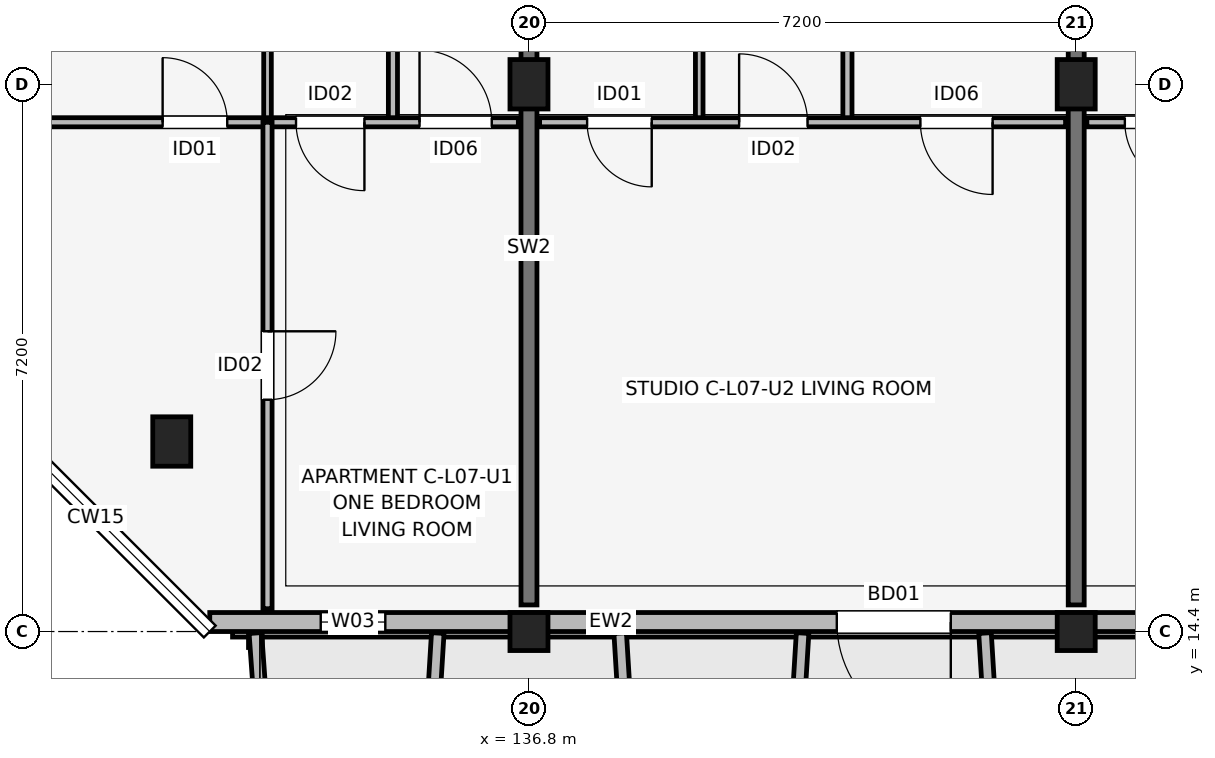
"""IFC4 building model, lengths in metres.
Left out: names, types, materials, properties, quantities, classifications, styles, units other than length and angle.
Written with IfcOpenShell. Run it as: python <this file> out.ifc"""

import sys

from ifc_helpers import new_model, si_unit, direction, frame, frame_2d, origin, origin_2d, place, context, subcontext, project, spatial, rectangle, extrude, element, fill, save


model = new_model("IFC4")
c1 = context("Model", 3, precision=1e-05, world=origin(), true_north=direction((0.0, 1.0)))
c2 = subcontext(c1, "Body", "Model", "MODEL_VIEW")
j1 = project(units=[si_unit("LENGTHUNIT", "METRE"), si_unit("PLANEANGLEUNIT", "RADIAN")], contexts=[c1])
p1 = place(None, origin())
s1 = spatial("IfcSite", under=j1, at=p1, CompositionType="ELEMENT")
p2 = place(p1, origin())
s2 = spatial("IfcBuilding", under=s1, at=p2, CompositionType="ELEMENT")
p3 = place(p2, frame((0.0, 0.0, 24.45)))
s3 = spatial("IfcBuildingStorey", under=s2, at=p3, CompositionType="ELEMENT", Elevation=24.45)
p4 = place(p3, frame((132.1, 16.9, 0.0), z_axis=(0.0, 0.0, 1.0), x_axis=(1.0, 0.0, 0.0)))
e1 = element("IfcColumn", 1, at=p4, inside=s3, PredefinedType="COLUMN", context=c2, shape_type="SweptSolid", body=[
    extrude(rectangle(XDim=0.5, YDim=0.65, at=origin_2d()), origin(), (0.0, 0.0, 1.0), 3.15),
])
p5 = place(p3, frame((136.8, 14.4, 0.0), z_axis=(0.0, 0.0, 1.0), x_axis=(1.0, 0.0, 0.0)))
e2 = element("IfcColumn", 2, at=p5, inside=s3, PredefinedType="COLUMN", context=c2, shape_type="SweptSolid", body=[
    extrude(rectangle(XDim=0.5, YDim=0.5, at=origin_2d()), origin(), (0.0, 0.0, 1.0), 3.15),
])
p6 = place(p3, frame((136.8, 21.6, 0.0), z_axis=(0.0, 0.0, 1.0), x_axis=(1.0, 0.0, 0.0)))
e3 = element("IfcColumn", 3, at=p6, inside=s3, PredefinedType="COLUMN", context=c2, shape_type="SweptSolid", body=[
    extrude(rectangle(XDim=0.5, YDim=0.65, at=origin_2d()), origin(), (0.0, 0.0, 1.0), 3.15),
])
p7 = place(p3, frame((144.0, 14.4, 0.0), z_axis=(0.0, 0.0, 1.0), x_axis=(1.0, 0.0, 0.0)))
e4 = element("IfcColumn", 4, at=p7, inside=s3, PredefinedType="COLUMN", context=c2, shape_type="SweptSolid", body=[
    extrude(rectangle(XDim=0.5, YDim=0.5, at=origin_2d()), origin(), (0.0, 0.0, 1.0), 3.15),
])
p8 = place(p3, frame((144.0, 21.6, 0.0), z_axis=(0.0, 0.0, 1.0), x_axis=(1.0, 0.0, 0.0)))
e5 = element("IfcColumn", 5, at=p8, inside=s3, PredefinedType="COLUMN", context=c2, shape_type="SweptSolid", body=[
    extrude(rectangle(XDim=0.5, YDim=0.65, at=origin_2d()), origin(), (0.0, 0.0, 1.0), 3.15),
])
for number, where, z_axis, x_axis in (
    (6, (136.8, 14.75, 0.0), (0.0, 0.0, 1.0), (0.0, 1.0, 0.0)),
    (7, (144.0, 14.75, 0.0), (0.0, 0.0, 1.0), (0.0, 1.0, 0.0)),
):
    element("IfcWall", number, at=place(p3, frame(where, z_axis=z_axis, x_axis=x_axis)), inside=s3, PredefinedType="SHEAR", context=c2, shape_type="SweptSolid", body=[
        extrude(rectangle(XDim=9.4, YDim=0.21, at=frame_2d((4.7, 0.0))), origin(), (0.0, 0.0, 1.0), 3.15),
    ])
p9 = place(p3, frame((132.6, 14.525, 0.0), z_axis=(0.0, 0.0, 1.0), x_axis=(1.0, 0.0, 0.0)))
e8 = element("IfcWall", 8, at=p9, inside=s3, PredefinedType="SOLIDWALL", context=c2, shape_type="SweptSolid", body=[
    extrude(rectangle(XDim=30.0, YDim=0.25, at=frame_2d((15.0, 0.0))), origin(), (0.0, 0.0, 1.0), 2.43),
])
p10 = place(p9, frame((9.75, 0.0, 0.0), z_axis=(0.0, 0.0, 1.0), x_axis=(-1.0, 0.0, 0.0)))
e9 = element("IfcOpeningElement", 9, at=p10, cuts=e8, PredefinedType="OPENING", context=c2, shape_type="SweptSolid", body=[
    extrude(rectangle(XDim=1.5, YDim=2.15, at=frame_2d((0.75, 1.075))), frame((0.0, 0.135, 0.0), z_axis=(0.0, -1.0, 0.0), x_axis=(1.0, 0.0, 0.0)), (0.0, 0.0, 1.0), 0.27),
])
p11 = place(p9, frame((24.3, 0.0, 0.0), z_axis=(0.0, 0.0, 1.0), x_axis=(-1.0, 0.0, 0.0)))
e10 = element("IfcOpeningElement", 10, at=p11, cuts=e8, PredefinedType="OPENING", context=c2, shape_type="SweptSolid", body=[
    extrude(rectangle(XDim=1.8, YDim=2.15, at=frame_2d((0.9, 1.075))), frame((0.0, 0.135, 0.0), z_axis=(0.0, -1.0, 0.0), x_axis=(1.0, 0.0, 0.0)), (0.0, 0.0, 1.0), 0.27),
])
p12 = place(p9, frame((1.46, 0.0, 0.75)))
e11 = element("IfcOpeningElement", 11, at=p12, cuts=e8, PredefinedType="OPENING", context=c2, shape_type="SweptSolid", body=[
    extrude(rectangle(XDim=0.85, YDim=1.4, at=frame_2d((0.425, 0.7))), frame((0.0, 0.135, 0.0), z_axis=(0.0, -1.0, 0.0), x_axis=(1.0, 0.0, 0.0)), (0.0, 0.0, 1.0), 0.27),
])
p13 = place(p9, frame((12.725, 0.0, 0.67)))
e12 = element("IfcOpeningElement", 12, at=p13, cuts=e8, PredefinedType="OPENING", context=c2, shape_type="SweptSolid", body=[
    extrude(rectangle(XDim=2.15, YDim=1.65, at=frame_2d((1.075, 0.825))), frame((0.0, 0.135, 0.0), z_axis=(0.0, -1.0, 0.0), x_axis=(1.0, 0.0, 0.0)), (0.0, 0.0, 1.0), 0.27),
])
p14 = place(p9, frame((19.045, 0.0, 0.75)))
e13 = element("IfcOpeningElement", 13, at=p14, cuts=e8, PredefinedType="OPENING", context=c2, shape_type="SweptSolid", body=[
    extrude(rectangle(XDim=0.6, YDim=1.25, at=frame_2d((0.3, 0.625))), frame((0.0, 0.135, 0.0), z_axis=(0.0, -1.0, 0.0), x_axis=(1.0, 0.0, 0.0)), (0.0, 0.0, 1.0), 0.27),
])
p15 = place(p9, frame((26.245, 0.0, 0.75)))
e14 = element("IfcOpeningElement", 14, at=p15, cuts=e8, PredefinedType="OPENING", context=c2, shape_type="SweptSolid", body=[
    extrude(rectangle(XDim=0.6, YDim=1.25, at=frame_2d((0.3, 0.625))), frame((0.0, 0.135, 0.0), z_axis=(0.0, -1.0, 0.0), x_axis=(1.0, 0.0, 0.0)), (0.0, 0.0, 1.0), 0.27),
])
p16 = place(p9, frame((27.93, 0.0, 0.75)))
e15 = element("IfcOpeningElement", 15, at=p16, cuts=e8, PredefinedType="OPENING", context=c2, shape_type="SweptSolid", body=[
    extrude(rectangle(XDim=1.34, YDim=1.55, at=frame_2d((0.67, 0.775))), frame((0.0, 0.135, 0.0), z_axis=(0.0, -1.0, 0.0), x_axis=(1.0, 0.0, 0.0)), (0.0, 0.0, 1.0), 0.27),
])
p17 = place(p3, frame((133.2, 14.38, 0.0), z_axis=(0.0, 0.0, 1.0), x_axis=(0.071317687608, -0.997453651772, 0.0)))
e16 = element("IfcWall", 16, at=p17, inside=s3, PredefinedType="ELEMENTEDWALL", context=c2, shape_type="SweptSolid", body=[
    extrude(rectangle(XDim=1.965, YDim=0.165, at=frame_2d((0.982, 0.0))), origin(), (0.0, 0.0, 1.0), 2.95),
])
p18 = place(p3, frame((135.6, 14.38, 0.0), z_axis=(0.0, 0.0, 1.0), x_axis=(-0.061170732449, -0.998127317276, 0.0)))
e17 = element("IfcWall", 17, at=p18, inside=s3, PredefinedType="ELEMENTEDWALL", context=c2, shape_type="SweptSolid", body=[
    extrude(rectangle(XDim=1.964, YDim=0.165, at=frame_2d((0.982, 0.0))), origin(), (0.0, 0.0, 1.0), 2.95),
])
for number, where, z_axis, x_axis in (
    (18, (138.0, 14.38, 0.0), (0.0, 0.0, 1.0), (0.061, -0.998, 0.0)),
    (19, (140.4, 14.38, 0.0), (0.0, 0.0, 1.0), (-0.061, -0.998, 0.0)),
    (20, (142.8, 14.38, 0.0), (0.0, 0.0, 1.0), (0.061, -0.998, 0.0)),
):
    element("IfcWall", number, at=place(p3, frame(where, z_axis=z_axis, x_axis=x_axis)), inside=s3, PredefinedType="ELEMENTEDWALL", context=c2, shape_type="SweptSolid", body=[
        extrude(rectangle(XDim=1.964, YDim=0.165, at=frame_2d((0.982, 0.0))), origin(), (0.0, 0.0, 1.0), 2.45),
    ])
p19 = place(p3, frame((133.36, 21.1, 0.0), z_axis=(0.0, 0.0, 1.0), x_axis=(0.0, 1.0, 0.0)))
e21 = element("IfcWall", 21, at=p19, inside=s3, PredefinedType="PARTITIONING", context=c2, shape_type="SweptSolid", body=[
    extrude(rectangle(XDim=3.2, YDim=0.1, at=frame_2d((1.6, 0.0))), origin(), (0.0, 0.0, 1.0), 2.38),
])
p20 = place(p3, frame((135.01, 21.1, 0.0), z_axis=(0.0, 0.0, 1.0), x_axis=(0.0, 1.0, 0.0)))
e22 = element("IfcWall", 22, at=p20, inside=s3, PredefinedType="PARTITIONING", context=c2, shape_type="SweptSolid", body=[
    extrude(rectangle(XDim=3.2, YDim=0.12, at=frame_2d((1.6, 0.0))), origin(), (0.0, 0.0, 1.0), 2.38),
])
p21 = place(p3, frame((129.74, 21.1, 0.0), z_axis=(0.0, 0.0, 1.0), x_axis=(1.0, 0.0, 0.0)))
e23 = element("IfcWall", 23, at=p21, inside=s3, PredefinedType="PARTITIONING", context=c2, shape_type="SweptSolid", body=[
    extrude(rectangle(XDim=6.92, YDim=0.12, at=frame_2d((3.46, 0.0))), origin(), (0.0, 0.0, 1.0), 2.38),
])
p22 = place(p21, frame((2.24, 0.0, 0.0)))
e24 = element("IfcOpeningElement", 24, at=p22, cuts=e23, PredefinedType="OPENING", context=c2, shape_type="SweptSolid", body=[
    extrude(rectangle(XDim=0.85, YDim=2.08, at=frame_2d((0.425, 1.04))), frame((0.0, 0.07, 0.0), z_axis=(0.0, -1.0, 0.0), x_axis=(1.0, 0.0, 0.0)), (0.0, 0.0, 1.0), 0.14),
])
p23 = place(p21, frame((4.895, 0.0, 0.0), z_axis=(0.0, 0.0, 1.0), x_axis=(-1.0, 0.0, 0.0)))
e25 = element("IfcOpeningElement", 25, at=p23, cuts=e23, PredefinedType="OPENING", context=c2, shape_type="SweptSolid", body=[
    extrude(rectangle(XDim=0.9, YDim=2.08, at=frame_2d((0.45, 1.04))), frame((0.0, 0.07, 0.0), z_axis=(0.0, -1.0, 0.0), x_axis=(1.0, 0.0, 0.0)), (0.0, 0.0, 1.0), 0.14),
])
p24 = place(p21, frame((5.62, 0.0, 0.0)))
e26 = element("IfcOpeningElement", 26, at=p24, cuts=e23, PredefinedType="OPENING", context=c2, shape_type="SweptSolid", body=[
    extrude(rectangle(XDim=0.95, YDim=2.08, at=frame_2d((0.475, 1.04))), frame((0.0, 0.07, 0.0), z_axis=(0.0, -1.0, 0.0), x_axis=(1.0, 0.0, 0.0)), (0.0, 0.0, 1.0), 0.14),
])
p25 = place(p3, frame((133.36, 14.7, 0.0), z_axis=(0.0, 0.0, 1.0), x_axis=(0.0, 1.0, 0.0)))
e27 = element("IfcWall", 27, at=p25, inside=s3, PredefinedType="PARTITIONING", context=c2, shape_type="SweptSolid", body=[
    extrude(rectangle(XDim=6.4, YDim=0.12, at=frame_2d((3.2, 0.0))), origin(), (0.0, 0.0, 1.0), 2.38),
])
p26 = place(p25, frame((3.65, 0.0, 0.0), z_axis=(0.0, 0.0, 1.0), x_axis=(-1.0, 0.0, 0.0)))
e28 = element("IfcOpeningElement", 28, at=p26, cuts=e27, PredefinedType="OPENING", context=c2, shape_type="SweptSolid", body=[
    extrude(rectangle(XDim=0.9, YDim=2.08, at=frame_2d((0.45, 1.04))), frame((0.0, 0.07, 0.0), z_axis=(0.0, -1.0, 0.0), x_axis=(1.0, 0.0, 0.0)), (0.0, 0.0, 1.0), 0.14),
])
p27 = place(p3, frame((139.04, 21.1, 0.0), z_axis=(0.0, 0.0, 1.0), x_axis=(0.0, 1.0, 0.0)))
e29 = element("IfcWall", 29, at=p27, inside=s3, PredefinedType="PARTITIONING", context=c2, shape_type="SweptSolid", body=[
    extrude(rectangle(XDim=3.2, YDim=0.1, at=frame_2d((1.6, 0.0))), origin(), (0.0, 0.0, 1.0), 2.38),
])
p28 = place(p3, frame((140.99, 21.1, 0.0), z_axis=(0.0, 0.0, 1.0), x_axis=(0.0, 1.0, 0.0)))
e30 = element("IfcWall", 30, at=p28, inside=s3, PredefinedType="PARTITIONING", context=c2, shape_type="SweptSolid", body=[
    extrude(rectangle(XDim=3.2, YDim=0.12, at=frame_2d((1.6, 0.0))), origin(), (0.0, 0.0, 1.0), 2.38),
])
p29 = place(p3, frame((136.94, 21.1, 0.0), z_axis=(0.0, 0.0, 1.0), x_axis=(1.0, 0.0, 0.0)))
e31 = element("IfcWall", 31, at=p29, inside=s3, PredefinedType="PARTITIONING", context=c2, shape_type="SweptSolid", body=[
    extrude(rectangle(XDim=6.92, YDim=0.12, at=frame_2d((3.46, 0.0))), origin(), (0.0, 0.0, 1.0), 2.38),
])
p30 = place(p29, frame((1.475, 0.0, 0.0), z_axis=(0.0, 0.0, 1.0), x_axis=(-1.0, 0.0, 0.0)))
e32 = element("IfcOpeningElement", 32, at=p30, cuts=e31, PredefinedType="OPENING", context=c2, shape_type="SweptSolid", body=[
    extrude(rectangle(XDim=0.85, YDim=2.08, at=frame_2d((0.425, 1.04))), frame((0.0, 0.07, 0.0), z_axis=(0.0, -1.0, 0.0), x_axis=(1.0, 0.0, 0.0)), (0.0, 0.0, 1.0), 0.14),
])
p31 = place(p29, frame((2.625, 0.0, 0.0)))
e33 = element("IfcOpeningElement", 33, at=p31, cuts=e31, PredefinedType="OPENING", context=c2, shape_type="SweptSolid", body=[
    extrude(rectangle(XDim=0.9, YDim=2.08, at=frame_2d((0.45, 1.04))), frame((0.0, 0.07, 0.0), z_axis=(0.0, -1.0, 0.0), x_axis=(1.0, 0.0, 0.0)), (0.0, 0.0, 1.0), 0.14),
])
p32 = place(p29, frame((5.96, 0.0, 0.0), z_axis=(0.0, 0.0, 1.0), x_axis=(-1.0, 0.0, 0.0)))
e34 = element("IfcOpeningElement", 34, at=p32, cuts=e31, PredefinedType="OPENING", context=c2, shape_type="SweptSolid", body=[
    extrude(rectangle(XDim=0.95, YDim=2.08, at=frame_2d((0.475, 1.04))), frame((0.0, 0.07, 0.0), z_axis=(0.0, -1.0, 0.0), x_axis=(1.0, 0.0, 0.0)), (0.0, 0.0, 1.0), 0.14),
])
p33 = place(p3, frame((144.14, 21.1, 0.0), z_axis=(0.0, 0.0, 1.0), x_axis=(1.0, 0.0, 0.0)))
e35 = element("IfcWall", 35, at=p33, inside=s3, PredefinedType="PARTITIONING", context=c2, shape_type="SweptSolid", body=[
    extrude(rectangle(XDim=6.92, YDim=0.12, at=frame_2d((3.46, 0.0))), origin(), (0.0, 0.0, 1.0), 2.38),
])
p34 = place(p33, frame((1.35, 0.0, 0.0), z_axis=(0.0, 0.0, 1.0), x_axis=(-1.0, 0.0, 0.0)))
e36 = element("IfcOpeningElement", 36, at=p34, cuts=e35, PredefinedType="OPENING", context=c2, shape_type="SweptSolid", body=[
    extrude(rectangle(XDim=0.85, YDim=2.08, at=frame_2d((0.425, 1.04))), frame((0.0, 0.07, 0.0), z_axis=(0.0, -1.0, 0.0), x_axis=(1.0, 0.0, 0.0)), (0.0, 0.0, 1.0), 0.14),
])
p35 = place(p33, frame((2.375, 0.0, 0.0)))
e37 = element("IfcOpeningElement", 37, at=p35, cuts=e35, PredefinedType="OPENING", context=c2, shape_type="SweptSolid", body=[
    extrude(rectangle(XDim=0.9, YDim=2.08, at=frame_2d((0.45, 1.04))), frame((0.0, 0.07, 0.0), z_axis=(0.0, -1.0, 0.0), x_axis=(1.0, 0.0, 0.0)), (0.0, 0.0, 1.0), 0.14),
])
p36 = place(p33, frame((5.835, 0.0, 0.0), z_axis=(0.0, 0.0, 1.0), x_axis=(-1.0, 0.0, 0.0)))
e38 = element("IfcOpeningElement", 38, at=p36, cuts=e35, PredefinedType="OPENING", context=c2, shape_type="SweptSolid", body=[
    extrude(rectangle(XDim=0.95, YDim=2.08, at=frame_2d((0.475, 1.04))), frame((0.0, 0.07, 0.0), z_axis=(0.0, -1.0, 0.0), x_axis=(1.0, 0.0, 0.0)), (0.0, 0.0, 1.0), 0.14),
])
p37 = place(p10, origin())
e39 = element("IfcDoor", 39, at=p37, inside=s3, OperationType="SINGLE_SWING_RIGHT", PredefinedType="DOOR", context=c2, shape_type="SweptSolid", body=[
    extrude(rectangle(XDim=1.5, YDim=2.15, at=frame_2d((0.75, 1.075))), frame((0.0, 0.025, 0.0), z_axis=(0.0, -1.0, 0.0), x_axis=(1.0, 0.0, 0.0)), (0.0, 0.0, 1.0), 0.05),
])
fill(e9, e39)
p38 = place(p12, origin())
e40 = element("IfcWindow", 40, at=p38, inside=s3, PartitioningType="SINGLE_PANEL", PredefinedType="WINDOW", context=c2, shape_type="SweptSolid", body=[
    extrude(rectangle(XDim=0.85, YDim=1.4, at=frame_2d((0.425, 0.7))), frame((0.0, 0.03, 0.0), z_axis=(0.0, -1.0, 0.0), x_axis=(1.0, 0.0, 0.0)), (0.0, 0.0, 1.0), 0.06),
])
fill(e11, e40)
p39 = place(p22, origin())
e41 = element("IfcDoor", 41, at=p39, inside=s3, OperationType="SINGLE_SWING_LEFT", PredefinedType="DOOR", context=c2, shape_type="SweptSolid", body=[
    extrude(rectangle(XDim=0.85, YDim=2.08, at=frame_2d((0.425, 1.04))), frame((0.0, 0.025, 0.0), z_axis=(0.0, -1.0, 0.0), x_axis=(1.0, 0.0, 0.0)), (0.0, 0.0, 1.0), 0.05),
])
fill(e24, e41)
p40 = place(p23, origin())
e42 = element("IfcDoor", 42, at=p40, inside=s3, OperationType="SINGLE_SWING_RIGHT", PredefinedType="DOOR", context=c2, shape_type="SweptSolid", body=[
    extrude(rectangle(XDim=0.9, YDim=2.08, at=frame_2d((0.45, 1.04))), frame((0.0, 0.025, 0.0), z_axis=(0.0, -1.0, 0.0), x_axis=(1.0, 0.0, 0.0)), (0.0, 0.0, 1.0), 0.05),
])
fill(e25, e42)
p41 = place(p24, origin())
e43 = element("IfcDoor", 43, at=p41, inside=s3, OperationType="SINGLE_SWING_LEFT", PredefinedType="DOOR", context=c2, shape_type="SweptSolid", body=[
    extrude(rectangle(XDim=0.95, YDim=2.08, at=frame_2d((0.475, 1.04))), frame((0.0, 0.025, 0.0), z_axis=(0.0, -1.0, 0.0), x_axis=(1.0, 0.0, 0.0)), (0.0, 0.0, 1.0), 0.05),
])
fill(e26, e43)
p42 = place(p26, origin())
e44 = element("IfcDoor", 44, at=p42, inside=s3, OperationType="SINGLE_SWING_RIGHT", PredefinedType="DOOR", context=c2, shape_type="SweptSolid", body=[
    extrude(rectangle(XDim=0.9, YDim=2.08, at=frame_2d((0.45, 1.04))), frame((0.0, 0.025, 0.0), z_axis=(0.0, -1.0, 0.0), x_axis=(1.0, 0.0, 0.0)), (0.0, 0.0, 1.0), 0.05),
])
fill(e28, e44)
p43 = place(p30, origin())
e45 = element("IfcDoor", 45, at=p43, inside=s3, OperationType="SINGLE_SWING_RIGHT", PredefinedType="DOOR", context=c2, shape_type="SweptSolid", body=[
    extrude(rectangle(XDim=0.85, YDim=2.08, at=frame_2d((0.425, 1.04))), frame((0.0, 0.025, 0.0), z_axis=(0.0, -1.0, 0.0), x_axis=(1.0, 0.0, 0.0)), (0.0, 0.0, 1.0), 0.05),
])
fill(e32, e45)
p44 = place(p31, origin())
e46 = element("IfcDoor", 46, at=p44, inside=s3, OperationType="SINGLE_SWING_LEFT", PredefinedType="DOOR", context=c2, shape_type="SweptSolid", body=[
    extrude(rectangle(XDim=0.9, YDim=2.08, at=frame_2d((0.45, 1.04))), frame((0.0, 0.025, 0.0), z_axis=(0.0, -1.0, 0.0), x_axis=(1.0, 0.0, 0.0)), (0.0, 0.0, 1.0), 0.05),
])
fill(e33, e46)
p45 = place(p32, origin())
e47 = element("IfcDoor", 47, at=p45, inside=s3, OperationType="SINGLE_SWING_RIGHT", PredefinedType="DOOR", context=c2, shape_type="SweptSolid", body=[
    extrude(rectangle(XDim=0.95, YDim=2.08, at=frame_2d((0.475, 1.04))), frame((0.0, 0.025, 0.0), z_axis=(0.0, -1.0, 0.0), x_axis=(1.0, 0.0, 0.0)), (0.0, 0.0, 1.0), 0.05),
])
fill(e34, e47)
p46 = place(p34, origin())
e48 = element("IfcDoor", 48, at=p46, inside=s3, OperationType="SINGLE_SWING_RIGHT", PredefinedType="DOOR", context=c2, shape_type="SweptSolid", body=[
    extrude(rectangle(XDim=0.85, YDim=2.08, at=frame_2d((0.425, 1.04))), frame((0.0, 0.025, 0.0), z_axis=(0.0, -1.0, 0.0), x_axis=(1.0, 0.0, 0.0)), (0.0, 0.0, 1.0), 0.05),
])
fill(e36, e48)
save(model, sys.argv[1])
